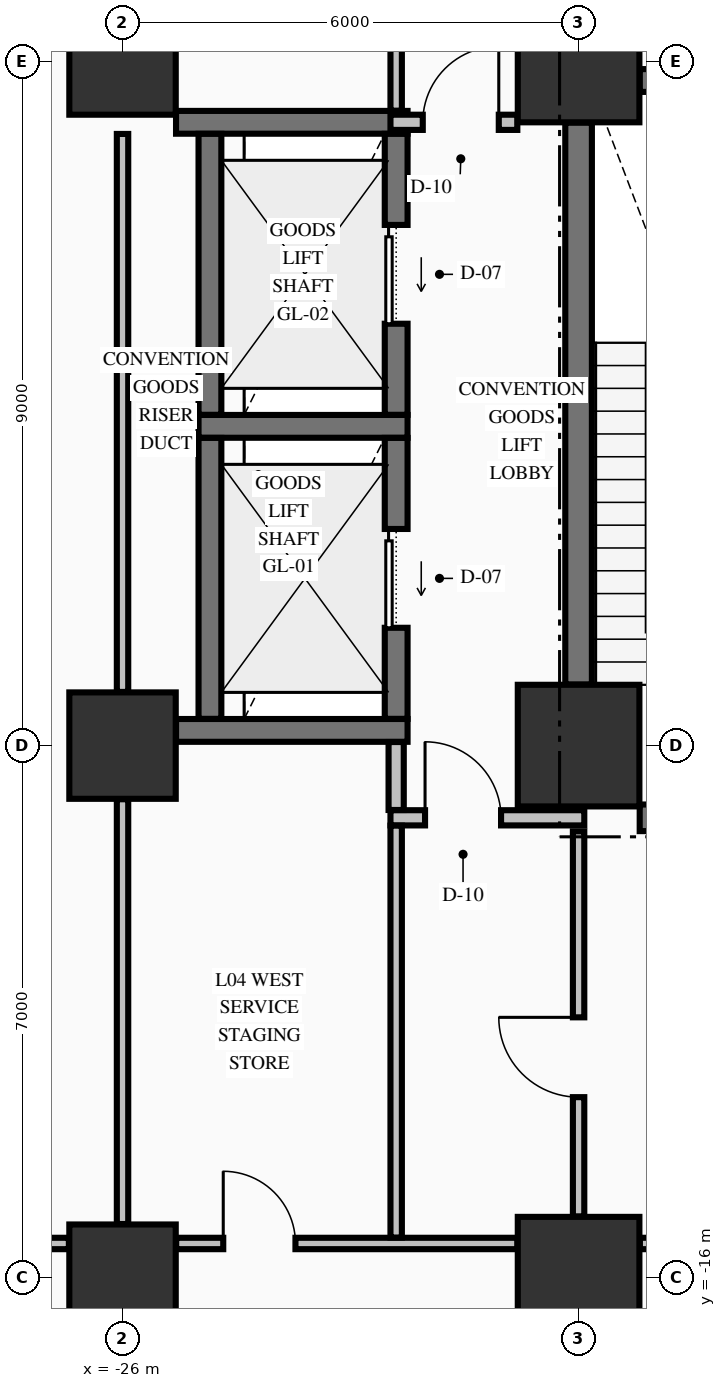
"""IFC4 building model, lengths in metres.
Left out: names, types, materials, properties, quantities, classifications, styles, units other than length and angle.
Written with IfcOpenShell. Run it as: python <this file> out.ifc"""

import sys

from ifc_helpers import new_model, si_unit, direction, frame, frame_2d, origin, origin_2d, place, context, subcontext, project, spatial, rectangle, extrude, element, fill, save


model = new_model("IFC4")
c1 = context("Model", 3, precision=1e-05, world=origin(), true_north=direction((0.0, 1.0)))
c2 = subcontext(c1, "Body", "Model", "MODEL_VIEW")
j1 = project(units=[si_unit("LENGTHUNIT", "METRE"), si_unit("PLANEANGLEUNIT", "RADIAN")], contexts=[c1])
p1 = place(None, origin())
s1 = spatial("IfcSite", under=j1, at=p1, CompositionType="ELEMENT")
p2 = place(p1, origin())
s2 = spatial("IfcBuilding", under=s1, at=p2, CompositionType="ELEMENT")
p3 = place(p2, frame((0.0, 0.0, 21.76)))
s3 = spatial("IfcBuildingStorey", under=s2, at=p3, CompositionType="ELEMENT", Elevation=21.76)
for number, where, z_axis, x_axis in (
    (1, (-26.0, -16.0, -0.45), (0.0, 0.0, 1.0), (1.0, 0.0, 0.0)),
    (2, (-26.0, -9.0, -0.45), (0.0, 0.0, 1.0), (1.0, 0.0, 0.0)),
    (3, (-26.0, 0.0, -0.45), (0.0, 0.0, 1.0), (1.0, 0.0, 0.0)),
):
    element("IfcColumn", number, at=place(p3, frame(where, z_axis=z_axis, x_axis=x_axis)), inside=s3, PredefinedType="COLUMN", context=c2, shape_type="SweptSolid", body=[
        extrude(rectangle(XDim=1.4, YDim=1.4, at=origin_2d()), origin(), (0.0, 0.0, 1.0), 5.44),
    ])
for number, where, z_axis, x_axis in (
    (4, (-20.0, -16.0, -0.45), (0.0, 0.0, 1.0), (1.0, 0.0, 0.0)),
    (5, (-20.0, -9.0, -0.45), (0.0, 0.0, 1.0), (1.0, 0.0, 0.0)),
    (6, (-20.0, 0.0, -0.45), (0.0, 0.0, 1.0), (1.0, 0.0, 0.0)),
):
    element("IfcColumn", number, at=place(p3, frame(where, z_axis=z_axis, x_axis=x_axis)), inside=s3, PredefinedType="COLUMN", context=c2, shape_type="SweptSolid", body=[
        extrude(rectangle(XDim=1.6, YDim=1.6, at=origin_2d()), origin(), (0.0, 0.0, 1.0), 5.44),
    ])
p4 = place(p3, frame((-19.196, -9.95, 0.0), z_axis=(0.0, 0.0, 1.0), x_axis=(1.0, 0.0, 0.0)))
e7 = element("IfcWall", 7, at=p4, inside=s3, PredefinedType="SHEAR", context=c2, shape_type="SweptSolid", body=[
    extrude(rectangle(XDim=4.496, YDim=0.35, at=frame_2d((2.248, 0.0))), origin(), (0.0, 0.0, 1.0), 4.99),
])
p5 = place(p4, frame((0.371, 0.0, 0.0)))
e8 = element("IfcOpeningElement", 8, at=p5, cuts=e7, PredefinedType="OPENING", context=c2, shape_type="SweptSolid", body=[
    extrude(rectangle(XDim=1.05, YDim=2.15, at=frame_2d((0.525, 1.075))), frame((0.0, 0.185, 0.0), z_axis=(0.0, -1.0, 0.0), x_axis=(1.0, 0.0, 0.0)), (0.0, 0.0, 1.0), 0.37),
])
p6 = place(p3, frame((-25.296, -8.8, 0.0), z_axis=(0.0, 0.0, 1.0), x_axis=(1.0, 0.0, 0.0)))
e9 = element("IfcWall", 9, at=p6, inside=s3, PredefinedType="SHEAR", context=c2, shape_type="SweptSolid", body=[
    extrude(rectangle(XDim=3.046, YDim=0.3, at=frame_2d((1.523, 0.0))), origin(), (0.0, 0.0, 1.0), 4.99),
])
p7 = place(p3, frame((-25.0, -4.8, 0.0), z_axis=(0.0, 0.0, 1.0), x_axis=(1.0, 0.0, 0.0)))
e10 = element("IfcWall", 10, at=p7, inside=s3, PredefinedType="SHEAR", context=c2, shape_type="SweptSolid", body=[
    extrude(rectangle(XDim=2.75, YDim=0.3, at=frame_2d((1.375, 0.0))), origin(), (0.0, 0.0, 1.0), 4.99),
])
p8 = place(p3, frame((-25.296, -0.8, 0.0), z_axis=(0.0, 0.0, 1.0), x_axis=(1.0, 0.0, 0.0)))
e11 = element("IfcWall", 11, at=p8, inside=s3, PredefinedType="SHEAR", context=c2, shape_type="SweptSolid", body=[
    extrude(rectangle(XDim=3.046, YDim=0.3, at=frame_2d((1.523, 0.0))), origin(), (0.0, 0.0, 1.0), 4.99),
])
p9 = place(p3, frame((-19.196, -0.25, 0.0), z_axis=(0.0, 0.0, 1.0), x_axis=(1.0, 0.0, 0.0)))
e12 = element("IfcWall", 12, at=p9, inside=s3, PredefinedType="SHEAR", context=c2, shape_type="SweptSolid", body=[
    extrude(rectangle(XDim=7.392, YDim=0.3, at=frame_2d((3.696, 0.0))), origin(), (0.0, 0.0, 1.0), 4.99),
])
p10 = place(p9, frame((5.496, 0.0, 0.0)))
e13 = element("IfcOpeningElement", 13, at=p10, cuts=e12, PredefinedType="OPENING", context=c2, shape_type="SweptSolid", body=[
    extrude(rectangle(XDim=1.1, YDim=2.15, at=frame_2d((0.55, 1.075))), frame((0.0, 0.16, 0.0), z_axis=(0.0, -1.0, 0.0), x_axis=(1.0, 0.0, 0.0)), (0.0, 0.0, 1.0), 0.32),
])
p11 = place(p3, frame((-29.294, -15.55, 0.0), z_axis=(0.0, 0.0, 1.0), x_axis=(1.0, 0.0, 0.0)))
e14 = element("IfcWall", 14, at=p11, inside=s3, PredefinedType="PARTITIONING", context=c2, shape_type="SweptSolid", body=[
    extrude(rectangle(XDim=2.588, YDim=0.15, at=frame_2d((1.294, 0.0))), origin(), (0.0, 0.0, 1.0), 3.332),
])
p12 = place(p11, frame((1.019, 0.0, 0.0)))
e15 = element("IfcOpeningElement", 15, at=p12, cuts=e14, PredefinedType="OPENING", context=c2, shape_type="SweptSolid", body=[
    extrude(rectangle(XDim=1.05, YDim=2.15, at=frame_2d((0.525, 1.075))), frame((0.0, 0.085, 0.0), z_axis=(0.0, -1.0, 0.0), x_axis=(1.0, 0.0, 0.0)), (0.0, 0.0, 1.0), 0.17),
])
p13 = place(p3, frame((-25.294, -15.55, 0.0), z_axis=(0.0, 0.0, 1.0), x_axis=(1.0, 0.0, 0.0)))
e16 = element("IfcWall", 16, at=p13, inside=s3, PredefinedType="PARTITIONING", context=c2, shape_type="SweptSolid", body=[
    extrude(rectangle(XDim=4.488, YDim=0.15, at=frame_2d((2.244, 0.0))), origin(), (0.0, 0.0, 1.0), 3.332),
])
p14 = place(p13, frame((0.619, 0.0, 0.0)))
e17 = element("IfcOpeningElement", 17, at=p14, cuts=e16, PredefinedType="OPENING", context=c2, shape_type="SweptSolid", body=[
    extrude(rectangle(XDim=0.95, YDim=2.15, at=frame_2d((0.475, 1.075))), frame((0.0, 0.085, 0.0), z_axis=(0.0, -1.0, 0.0), x_axis=(1.0, 0.0, 0.0)), (0.0, 0.0, 1.0), 0.17),
])
p15 = place(p3, frame((-19.194, -15.55, 0.0), z_axis=(0.0, 0.0, 1.0), x_axis=(1.0, 0.0, 0.0)))
e18 = element("IfcWall", 18, at=p15, inside=s3, PredefinedType="PARTITIONING", context=c2, shape_type="SweptSolid", body=[
    extrude(rectangle(XDim=7.388, YDim=0.15, at=frame_2d((3.694, 0.0))), origin(), (0.0, 0.0, 1.0), 3.332),
])
p16 = place(p15, frame((3.094, 0.0, 0.0)))
e19 = element("IfcOpeningElement", 19, at=p16, cuts=e18, PredefinedType="OPENING", context=c2, shape_type="SweptSolid", body=[
    extrude(rectangle(XDim=1.2, YDim=2.15, at=frame_2d((0.6, 1.075))), frame((0.0, 0.085, 0.0), z_axis=(0.0, -1.0, 0.0), x_axis=(1.0, 0.0, 0.0)), (0.0, 0.0, 1.0), 0.17),
])
p17 = place(p3, frame((-22.475, -9.95, 0.0), z_axis=(0.0, 0.0, 1.0), x_axis=(1.0, 0.0, 0.0)))
e20 = element("IfcWall", 20, at=p17, inside=s3, PredefinedType="PARTITIONING", context=c2, shape_type="SweptSolid", body=[
    extrude(rectangle(XDim=2.55, YDim=0.2, at=frame_2d((1.275, 0.0))), origin(), (0.0, 0.0, 1.0), 4.99),
])
p18 = place(p17, frame((0.455, 0.0, 0.0)))
e21 = element("IfcOpeningElement", 21, at=p18, cuts=e20, PredefinedType="OPENING", context=c2, shape_type="SweptSolid", body=[
    extrude(rectangle(XDim=1.0, YDim=2.15, at=frame_2d((0.5, 1.075))), frame((0.0, 0.11, 0.0), z_axis=(0.0, -1.0, 0.0), x_axis=(1.0, 0.0, 0.0)), (0.0, 0.0, 1.0), 0.22),
])
p19 = place(p3, frame((-22.475, -0.8, 0.0), z_axis=(0.0, 0.0, 1.0), x_axis=(1.0, 0.0, 0.0)))
e22 = element("IfcWall", 22, at=p19, inside=s3, PredefinedType="PARTITIONING", context=c2, shape_type="SweptSolid", body=[
    extrude(rectangle(XDim=1.669, YDim=0.2, at=frame_2d((0.834, 0.0))), origin(), (0.0, 0.0, 1.0), 4.99),
])
p20 = place(p19, frame((0.425, 0.0, 0.0)))
e23 = element("IfcOpeningElement", 23, at=p20, cuts=e22, PredefinedType="OPENING", context=c2, shape_type="SweptSolid", body=[
    extrude(rectangle(XDim=1.0, YDim=2.15, at=frame_2d((0.5, 1.075))), frame((0.0, 0.11, 0.0), z_axis=(0.0, -1.0, 0.0), x_axis=(1.0, 0.0, 0.0)), (0.0, 0.0, 1.0), 0.22),
])
for number, where, z_axis, x_axis in (
    (24, (-24.85, -8.648, 0.0), (0.0, 0.0, 1.0), (0.0, 1.0, 0.0)),
    (25, (-24.85, -4.648, 0.0), (0.0, 0.0, 1.0), (0.0, 1.0, 0.0)),
):
    element("IfcWall", number, at=place(p3, frame(where, z_axis=z_axis, x_axis=x_axis)), inside=s3, PredefinedType="SHEAR", context=c2, shape_type="SweptSolid", body=[
        extrude(rectangle(XDim=3.696, YDim=0.3, at=frame_2d((1.848, 0.0))), origin(), (0.0, 0.0, 1.0), 4.99),
    ])
p21 = place(p3, frame((-22.4, -8.648, 0.0), z_axis=(0.0, 0.0, 1.0), x_axis=(0.0, 1.0, 0.0)))
e26 = element("IfcWall", 26, at=p21, inside=s3, PredefinedType="SHEAR", context=c2, shape_type="SweptSolid", body=[
    extrude(rectangle(XDim=3.696, YDim=0.3, at=frame_2d((1.848, 0.0))), origin(), (0.0, 0.0, 1.0), 4.99),
])
p22 = place(p21, frame((1.198, 0.0, 0.0)))
e27 = element("IfcOpeningElement", 27, at=p22, cuts=e26, PredefinedType="OPENING", context=c2, shape_type="SweptSolid", body=[
    extrude(rectangle(XDim=1.3, YDim=2.3, at=frame_2d((0.65, 1.15))), frame((0.0, 0.16, 0.0), z_axis=(0.0, -1.0, 0.0), x_axis=(1.0, 0.0, 0.0)), (0.0, 0.0, 1.0), 0.32),
])
p23 = place(p3, frame((-22.4, -4.648, 0.0), z_axis=(0.0, 0.0, 1.0), x_axis=(0.0, 1.0, 0.0)))
e28 = element("IfcWall", 28, at=p23, inside=s3, PredefinedType="SHEAR", context=c2, shape_type="SweptSolid", body=[
    extrude(rectangle(XDim=3.696, YDim=0.3, at=frame_2d((1.848, 0.0))), origin(), (0.0, 0.0, 1.0), 4.99),
])
p24 = place(p23, frame((1.198, 0.0, 0.0)))
e29 = element("IfcOpeningElement", 29, at=p24, cuts=e28, PredefinedType="OPENING", context=c2, shape_type="SweptSolid", body=[
    extrude(rectangle(XDim=1.3, YDim=2.3, at=frame_2d((0.65, 1.15))), frame((0.0, 0.16, 0.0), z_axis=(0.0, -1.0, 0.0), x_axis=(1.0, 0.0, 0.0)), (0.0, 0.0, 1.0), 0.32),
])
p25 = place(p3, frame((-20.0, -8.196, 0.0), z_axis=(0.0, 0.0, 1.0), x_axis=(0.0, 1.0, 0.0)))
e30 = element("IfcWall", 30, at=p25, inside=s3, PredefinedType="SHEAR", context=c2, shape_type="SweptSolid", body=[
    extrude(rectangle(XDim=7.392, YDim=0.35, at=frame_2d((3.696, 0.0))), origin(), (0.0, 0.0, 1.0), 4.99),
])
p26 = place(p3, frame((-26.0, -15.294, 0.0), z_axis=(0.0, 0.0, 1.0), x_axis=(0.0, 1.0, 0.0)))
e31 = element("IfcWall", 31, at=p26, inside=s3, PredefinedType="PARTITIONING", context=c2, shape_type="SweptSolid", body=[
    extrude(rectangle(XDim=5.588, YDim=0.15, at=frame_2d((2.794, 0.0))), origin(), (0.0, 0.0, 1.0), 3.332),
])
p27 = place(p3, frame((-26.0, -8.294, 0.0), z_axis=(0.0, 0.0, 1.0), x_axis=(0.0, 1.0, 0.0)))
e32 = element("IfcWall", 32, at=p27, inside=s3, PredefinedType="PARTITIONING", context=c2, shape_type="SweptSolid", body=[
    extrude(rectangle(XDim=7.341, YDim=0.15, at=frame_2d((3.67, 0.0))), origin(), (0.0, 0.0, 1.0), 3.332),
])
p28 = place(p3, frame((-22.4, -15.472, 0.0), z_axis=(0.0, 0.0, 1.0), x_axis=(0.0, 1.0, 0.0)))
e33 = element("IfcWall", 33, at=p28, inside=s3, PredefinedType="PARTITIONING", context=c2, shape_type="SweptSolid", body=[
    extrude(rectangle(XDim=5.419, YDim=0.15, at=frame_2d((2.709, 0.0))), origin(), (0.0, 0.0, 1.0), 4.99),
])
p29 = place(p3, frame((-22.4, -9.847, 0.0), z_axis=(0.0, 0.0, 1.0), x_axis=(0.0, 1.0, 0.0)))
e34 = element("IfcWall", 34, at=p29, inside=s3, PredefinedType="PARTITIONING", context=c2, shape_type="SweptSolid", body=[
    extrude(rectangle(XDim=0.894, YDim=0.2, at=frame_2d((0.447, 0.0))), origin(), (0.0, 0.0, 1.0), 4.99),
])
p30 = place(p3, frame((-22.4, -0.647, 0.0), z_axis=(0.0, 0.0, 1.0), x_axis=(0.0, 1.0, 0.0)))
e35 = element("IfcWall", 35, at=p30, inside=s3, PredefinedType="PARTITIONING", context=c2, shape_type="SweptSolid", body=[
    extrude(rectangle(XDim=16.569, YDim=0.15, at=frame_2d((8.285, 0.0))), origin(), (0.0, 0.0, 1.0), 4.99),
])
p31 = place(p30, frame((6.597, 0.0, 0.0)))
e36 = element("IfcOpeningElement", 36, at=p31, cuts=e35, PredefinedType="OPENING", context=c2, shape_type="SweptSolid", body=[
    extrude(rectangle(XDim=1.1, YDim=2.15, at=frame_2d((0.55, 1.075))), frame((0.0, 0.085, 0.0), z_axis=(0.0, -1.0, 0.0), x_axis=(1.0, 0.0, 0.0)), (0.0, 0.0, 1.0), 0.17),
])
p32 = place(p3, frame((-20.0, -15.194, 0.0), z_axis=(0.0, 0.0, 1.0), x_axis=(0.0, 1.0, 0.0)))
e37 = element("IfcWall", 37, at=p32, inside=s3, PredefinedType="PARTITIONING", context=c2, shape_type="SweptSolid", body=[
    extrude(rectangle(XDim=5.066, YDim=0.15, at=frame_2d((2.533, 0.0))), origin(), (0.0, 0.0, 1.0), 3.332),
])
p33 = place(p32, frame((1.569, 0.0, 0.0)))
e38 = element("IfcOpeningElement", 38, at=p33, cuts=e37, PredefinedType="OPENING", context=c2, shape_type="SweptSolid", body=[
    extrude(rectangle(XDim=1.05, YDim=2.15, at=frame_2d((0.525, 1.075))), frame((0.0, 0.085, 0.0), z_axis=(0.0, -1.0, 0.0), x_axis=(1.0, 0.0, 0.0)), (0.0, 0.0, 1.0), 0.17),
])
p34 = place(p22, origin())
e39 = element("IfcDoor", 39, at=p34, inside=s3, OperationType="SLIDING_TO_LEFT", PredefinedType="DOOR", context=c2, shape_type="SweptSolid", body=[
    extrude(rectangle(XDim=1.3, YDim=2.3, at=frame_2d((0.65, 1.15))), frame((0.0, 0.025, 0.0), z_axis=(0.0, -1.0, 0.0), x_axis=(1.0, 0.0, 0.0)), (0.0, 0.0, 1.0), 0.05),
])
fill(e27, e39)
p35 = place(p24, origin())
e40 = element("IfcDoor", 40, at=p35, inside=s3, OperationType="SLIDING_TO_LEFT", PredefinedType="DOOR", context=c2, shape_type="SweptSolid", body=[
    extrude(rectangle(XDim=1.3, YDim=2.3, at=frame_2d((0.65, 1.15))), frame((0.0, 0.025, 0.0), z_axis=(0.0, -1.0, 0.0), x_axis=(1.0, 0.0, 0.0)), (0.0, 0.0, 1.0), 0.05),
])
fill(e29, e40)
p36 = place(p20, origin())
e41 = element("IfcDoor", 41, at=p36, inside=s3, OperationType="SINGLE_SWING_RIGHT", PredefinedType="DOOR", context=c2, shape_type="SweptSolid", body=[
    extrude(rectangle(XDim=1.0, YDim=2.15, at=frame_2d((0.5, 1.075))), frame((0.0, 0.025, 0.0), z_axis=(0.0, -1.0, 0.0), x_axis=(1.0, 0.0, 0.0)), (0.0, 0.0, 1.0), 0.05),
])
fill(e23, e41)
p37 = place(p18, origin())
e42 = element("IfcDoor", 42, at=p37, inside=s3, OperationType="SINGLE_SWING_LEFT", PredefinedType="DOOR", context=c2, shape_type="SweptSolid", body=[
    extrude(rectangle(XDim=1.0, YDim=2.15, at=frame_2d((0.5, 1.075))), frame((0.0, 0.025, 0.0), z_axis=(0.0, -1.0, 0.0), x_axis=(1.0, 0.0, 0.0)), (0.0, 0.0, 1.0), 0.05),
])
fill(e21, e42)
p38 = place(p33, origin())
e43 = element("IfcDoor", 43, at=p38, inside=s3, OperationType="SINGLE_SWING_RIGHT", PredefinedType="DOOR", context=c2, shape_type="SweptSolid", body=[
    extrude(rectangle(XDim=1.05, YDim=2.15, at=frame_2d((0.525, 1.075))), frame((0.0, 0.025, 0.0), z_axis=(0.0, -1.0, 0.0), x_axis=(1.0, 0.0, 0.0)), (0.0, 0.0, 1.0), 0.05),
])
fill(e38, e43)
p39 = place(p14, origin())
e44 = element("IfcDoor", 44, at=p39, inside=s3, OperationType="SINGLE_SWING_LEFT", PredefinedType="DOOR", context=c2, shape_type="SweptSolid", body=[
    extrude(rectangle(XDim=0.95, YDim=2.15, at=frame_2d((0.475, 1.075))), frame((0.0, 0.025, 0.0), z_axis=(0.0, -1.0, 0.0), x_axis=(1.0, 0.0, 0.0)), (0.0, 0.0, 1.0), 0.05),
])
fill(e17, e44)
save(model, sys.argv[1])
